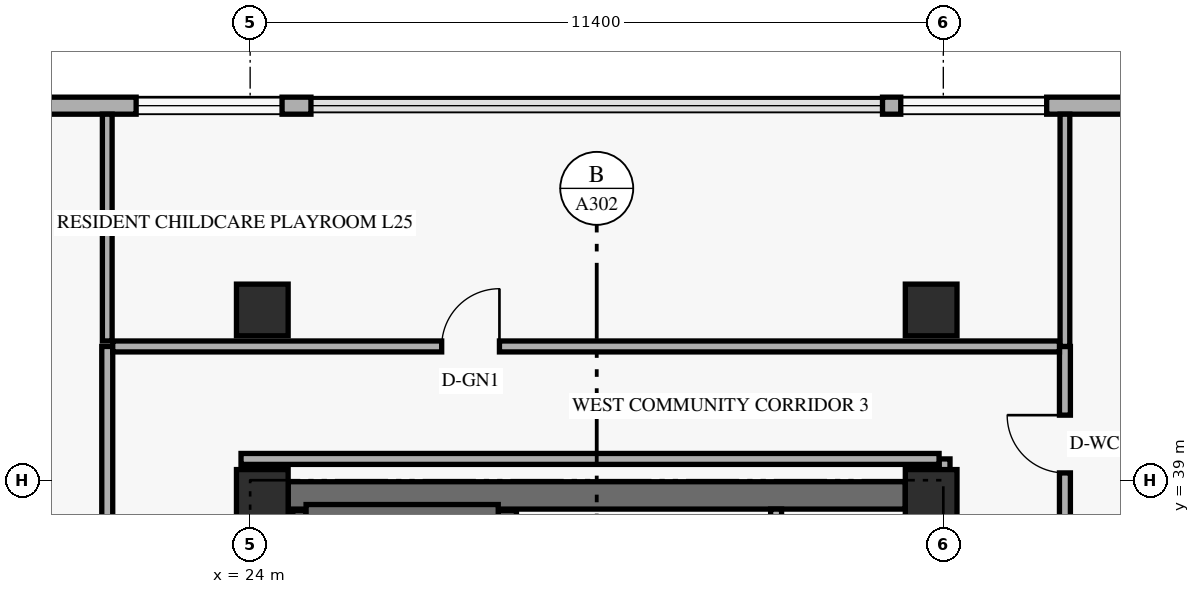
"""IFC4 building model, lengths in metres.
Left out: names, types, materials, properties, quantities, classifications, styles, units other than length and angle.
Written with IfcOpenShell. Run it as: python <this file> out.ifc"""

import sys

from ifc_helpers import new_model, si_unit, direction, frame, frame_2d, origin, origin_2d, place, context, subcontext, project, spatial, rectangle, extrude, element, fill, save


model = new_model("IFC4")
c1 = context("Model", 3, precision=1e-05, world=origin(), true_north=direction((0.0, 1.0)))
c2 = subcontext(c1, "Body", "Model", "MODEL_VIEW")
j1 = project(units=[si_unit("LENGTHUNIT", "METRE"), si_unit("PLANEANGLEUNIT", "RADIAN")], contexts=[c1])
p1 = place(None, origin())
s1 = spatial("IfcSite", under=j1, at=p1, CompositionType="ELEMENT")
p2 = place(p1, origin())
s2 = spatial("IfcBuilding", under=s1, at=p2, CompositionType="ELEMENT")
p3 = place(p2, frame((0.0, 0.0, 98.4)))
s3 = spatial("IfcBuildingStorey", under=s2, at=p3, CompositionType="ELEMENT", Elevation=98.4)
p4 = place(p3, frame((24.625, 38.75, 0.0), z_axis=(0.0, 0.0, 1.0), x_axis=(1.0, 0.0, 0.0)))
e1 = element("IfcWall", 1, at=p4, inside=s3, PredefinedType="SHEAR", context=c2, shape_type="SweptSolid", body=[
    extrude(rectangle(XDim=10.15, YDim=0.45, at=frame_2d((5.075, 0.0))), origin(), (0.0, 0.0, 1.0), 3.96),
])
p5 = place(p3, frame((24.81, 30.74, 0.0), z_axis=(0.0, 0.0, 1.0), x_axis=(0.0, 1.0, 0.0)))
e2 = element("IfcWall", 2, at=p5, inside=s3, PredefinedType="SHEAR", context=c2, shape_type="SweptSolid", body=[
    extrude(rectangle(XDim=7.76, YDim=0.22, at=frame_2d((3.88, 0.0))), origin(), (0.0, 0.0, 1.0), 3.96),
])
p6 = place(p3, frame((28.23, 30.74, 0.0), z_axis=(0.0, 0.0, 1.0), x_axis=(0.0, 1.0, 0.0)))
e3 = element("IfcWall", 3, at=p6, inside=s3, PredefinedType="SHEAR", context=c2, shape_type="SweptSolid", body=[
    extrude(rectangle(XDim=7.76, YDim=0.3, at=frame_2d((3.88, 0.0))), origin(), (0.0, 0.0, 1.0), 3.96),
])
p7 = place(p3, frame((24.92, 38.49, 0.0), z_axis=(0.0, 0.0, 1.0), x_axis=(1.0, 0.0, 0.0)))
e4 = element("IfcWall", 4, at=p7, inside=s3, PredefinedType="SHEAR", context=c2, shape_type="SweptSolid", body=[
    extrude(rectangle(XDim=3.16, YDim=0.22, at=frame_2d((1.58, 0.0))), origin(), (0.0, 0.0, 1.0), 3.96),
])
for number, where, z_axis, x_axis in (
    (5, (24.2, 38.75, 0.0), (0.0, 0.0, 1.0), (1.0, 0.0, 0.0)),
    (6, (24.2, 41.8, 0.0), (0.0, 0.0, 1.0), (1.0, 0.0, 0.0)),
    (7, (35.2, 38.75, 0.0), (0.0, 0.0, 1.0), (1.0, 0.0, 0.0)),
    (8, (35.2, 41.8, 0.0), (0.0, 0.0, 1.0), (1.0, 0.0, 0.0)),
):
    element("IfcColumn", number, at=place(p3, frame(where, z_axis=z_axis, x_axis=x_axis)), inside=s3, PredefinedType="COLUMN", context=c2, shape_type="SweptSolid", body=[
        extrude(rectangle(XDim=0.85, YDim=0.85, at=origin_2d()), origin(), (0.0, 0.0, 1.0), 4.2),
    ])
p8 = place(p3, frame((49.98, 45.16, 0.0), z_axis=(0.0, 0.0, 1.0), x_axis=(-1.0, 0.0, 0.0)))
e9 = element("IfcWall", 9, at=p8, inside=s3, PredefinedType="SOLIDWALL", context=c2, shape_type="SweptSolid", body=[
    extrude(rectangle(XDim=15.58, YDim=0.28, at=frame_2d((7.79, 0.0))), origin(), (0.0, 0.0, 1.0), 3.96),
])
p9 = place(p8, frame((12.88, 0.0, 0.85)))
e10 = element("IfcOpeningElement", 10, at=p9, cuts=e9, PredefinedType="OPENING", context=c2, shape_type="SweptSolid", body=[
    extrude(rectangle(XDim=2.4, YDim=1.9, at=frame_2d((1.2, 0.95))), frame((0.0, 0.15, 0.0), z_axis=(0.0, -1.0, 0.0), x_axis=(1.0, 0.0, 0.0)), (0.0, 0.0, 1.0), 0.3),
])
p10 = place(p8, frame((8.33, 0.0, 0.85)))
e11 = element("IfcOpeningElement", 11, at=p10, cuts=e9, PredefinedType="OPENING", context=c2, shape_type="SweptSolid", body=[
    extrude(rectangle(XDim=2.4, YDim=1.9, at=frame_2d((1.2, 0.95))), frame((0.0, 0.15, 0.0), z_axis=(0.0, -1.0, 0.0), x_axis=(1.0, 0.0, 0.0)), (0.0, 0.0, 1.0), 0.3),
])
p11 = place(p8, frame((2.04, 0.0, 0.85)))
e12 = element("IfcOpeningElement", 12, at=p11, cuts=e9, PredefinedType="OPENING", context=c2, shape_type="SweptSolid", body=[
    extrude(rectangle(XDim=2.4, YDim=1.9, at=frame_2d((1.2, 0.95))), frame((0.0, 0.15, 0.0), z_axis=(0.0, -1.0, 0.0), x_axis=(1.0, 0.0, 0.0)), (0.0, 0.0, 1.0), 0.3),
])
p12 = place(p3, frame((25.0, 45.16, 0.0), z_axis=(0.0, 0.0, 1.0), x_axis=(-1.0, 0.0, 0.0)))
e13 = element("IfcWall", 13, at=p12, inside=s3, PredefinedType="SOLIDWALL", context=c2, shape_type="SweptSolid", body=[
    extrude(rectangle(XDim=11.58, YDim=0.28, at=frame_2d((5.79, 0.0))), origin(), (0.0, 0.0, 1.0), 3.96),
])
p13 = place(p12, frame((6.265, 0.0, 0.85)))
e14 = element("IfcOpeningElement", 14, at=p13, cuts=e13, PredefinedType="OPENING", context=c2, shape_type="SweptSolid", body=[
    extrude(rectangle(XDim=2.4, YDim=1.9, at=frame_2d((1.2, 0.95))), frame((0.0, 0.15, 0.0), z_axis=(0.0, -1.0, 0.0), x_axis=(1.0, 0.0, 0.0)), (0.0, 0.0, 1.0), 0.3),
])
p14 = place(p12, frame((0.475, 0.0, 0.85)))
e15 = element("IfcOpeningElement", 15, at=p14, cuts=e13, PredefinedType="OPENING", context=c2, shape_type="SweptSolid", body=[
    extrude(rectangle(XDim=2.4, YDim=1.9, at=frame_2d((1.2, 0.95))), frame((0.0, 0.15, 0.0), z_axis=(0.0, -1.0, 0.0), x_axis=(1.0, 0.0, 0.0)), (0.0, 0.0, 1.0), 0.3),
])
p15 = place(p3, frame((32.65, 31.35, 0.0), z_axis=(0.0, 0.0, 1.0), x_axis=(0.0, 1.0, 0.0)))
e16 = element("IfcWall", 16, at=p15, inside=s3, PredefinedType="STANDARD", context=c2, shape_type="SweptSolid", body=[
    extrude(rectangle(XDim=7.175, YDim=0.18, at=frame_2d((3.587, 0.0))), origin(), (0.0, 0.0, 1.0), 3.96),
])
p16 = place(p15, frame((0.52, 0.0, 0.0)))
e17 = element("IfcOpeningElement", 17, at=p16, cuts=e16, PredefinedType="OPENING", context=c2, shape_type="SweptSolid", body=[
    extrude(rectangle(XDim=1.05, YDim=2.2, at=frame_2d((0.525, 1.1))), frame((0.0, 0.1, 0.0), z_axis=(0.0, -1.0, 0.0), x_axis=(1.0, 0.0, 0.0)), (0.0, 0.0, 1.0), 0.2),
])
p17 = place(p15, frame((2.67, 0.0, 0.0)))
e18 = element("IfcOpeningElement", 18, at=p17, cuts=e16, PredefinedType="OPENING", context=c2, shape_type="SweptSolid", body=[
    extrude(rectangle(XDim=1.05, YDim=2.2, at=frame_2d((0.525, 1.1))), frame((0.0, 0.1, 0.0), z_axis=(0.0, -1.0, 0.0), x_axis=(1.0, 0.0, 0.0)), (0.0, 0.0, 1.0), 0.2),
])
p18 = place(p15, frame((4.82, 0.0, 0.0)))
e19 = element("IfcOpeningElement", 19, at=p18, cuts=e16, PredefinedType="OPENING", context=c2, shape_type="SweptSolid", body=[
    extrude(rectangle(XDim=1.05, YDim=2.2, at=frame_2d((0.525, 1.1))), frame((0.0, 0.1, 0.0), z_axis=(0.0, -1.0, 0.0), x_axis=(1.0, 0.0, 0.0)), (0.0, 0.0, 1.0), 0.2),
])
p19 = place(p3, frame((37.4, 6.8, 0.0), z_axis=(0.0, 0.0, 1.0), x_axis=(0.0, 1.0, 0.0)))
e20 = element("IfcWall", 20, at=p19, inside=s3, PredefinedType="STANDARD", context=c2, shape_type="SweptSolid", body=[
    extrude(rectangle(XDim=34.4, YDim=0.18, at=frame_2d((17.2, 0.0))), origin(), (0.0, 0.0, 1.0), 3.331),
])
p20 = place(p19, frame((25.29, 0.0, 0.0)))
e21 = element("IfcOpeningElement", 21, at=p20, cuts=e20, PredefinedType="OPENING", context=c2, shape_type="SweptSolid", body=[
    extrude(rectangle(XDim=0.92, YDim=2.14, at=frame_2d((0.46, 1.07))), frame((0.0, 0.1, 0.0), z_axis=(0.0, -1.0, 0.0), x_axis=(1.0, 0.0, 0.0)), (0.0, 0.0, 1.0), 0.2),
])
p21 = place(p19, frame((32.32, 0.0, 0.0)))
e22 = element("IfcOpeningElement", 22, at=p21, cuts=e20, PredefinedType="OPENING", context=c2, shape_type="SweptSolid", body=[
    extrude(rectangle(XDim=0.95, YDim=2.14, at=frame_2d((0.475, 1.07))), frame((0.0, 0.1, 0.0), z_axis=(0.0, -1.0, 0.0), x_axis=(1.0, 0.0, 0.0)), (0.0, 0.0, 1.0), 0.2),
])
p22 = place(p19, frame((2.8, 0.0, 0.0)))
e23 = element("IfcOpeningElement", 23, at=p22, cuts=e20, PredefinedType="OPENING", context=c2, shape_type="SweptSolid", body=[
    extrude(rectangle(XDim=1.15, YDim=2.15, at=frame_2d((0.575, 1.075))), frame((0.0, 0.1, 0.0), z_axis=(0.0, -1.0, 0.0), x_axis=(1.0, 0.0, 0.0)), (0.0, 0.0, 1.0), 0.2),
])
p23 = place(p19, frame((21.6, 0.0, 0.0)))
e24 = element("IfcOpeningElement", 24, at=p23, cuts=e20, PredefinedType="OPENING", context=c2, shape_type="SweptSolid", body=[
    extrude(rectangle(XDim=1.15, YDim=2.15, at=frame_2d((0.575, 1.075))), frame((0.0, 0.1, 0.0), z_axis=(0.0, -1.0, 0.0), x_axis=(1.0, 0.0, 0.0)), (0.0, 0.0, 1.0), 0.2),
])
p24 = place(p3, frame((37.4, 41.2, 0.0), z_axis=(0.0, 0.0, 1.0), x_axis=(0.0, 1.0, 0.0)))
e25 = element("IfcWall", 25, at=p24, inside=s3, PredefinedType="PARTITIONING", context=c2, shape_type="SweptSolid", body=[
    extrude(rectangle(XDim=3.82, YDim=0.16, at=frame_2d((1.91, 0.0))), origin(), (0.0, 0.0, 1.0), 3.409),
])
p25 = place(p3, frame((35.42, 38.75, 0.0), z_axis=(0.0, 0.0, 1.0), x_axis=(0.0, 1.0, 0.0)))
e26 = element("IfcWall", 26, at=p25, inside=s3, PredefinedType="STANDARD", context=c2, shape_type="SweptSolid", body=[
    extrude(rectangle(XDim=0.6, YDim=0.18, at=frame_2d((0.3, 0.0))), origin(), (0.0, 0.0, 1.0), 3.331),
])
p26 = place(p3, frame((21.65, 6.8, 0.0), z_axis=(0.0, 0.0, 1.0), x_axis=(0.0, 1.0, 0.0)))
e27 = element("IfcWall", 27, at=p26, inside=s3, PredefinedType="STANDARD", context=c2, shape_type="SweptSolid", body=[
    extrude(rectangle(XDim=34.4, YDim=0.18, at=frame_2d((17.2, 0.0))), origin(), (0.0, 0.0, 1.0), 3.331),
])
p27 = place(p26, frame((15.2, 0.0, 0.0)))
e28 = element("IfcOpeningElement", 28, at=p27, cuts=e27, PredefinedType="OPENING", context=c2, shape_type="SweptSolid", body=[
    extrude(rectangle(XDim=0.95, YDim=2.15, at=frame_2d((0.475, 1.075))), frame((0.0, 0.1, 0.0), z_axis=(0.0, -1.0, 0.0), x_axis=(1.0, 0.0, 0.0)), (0.0, 0.0, 1.0), 0.2),
])
p28 = place(p26, frame((6.2, 0.0, 0.0)))
e29 = element("IfcOpeningElement", 29, at=p28, cuts=e27, PredefinedType="OPENING", context=c2, shape_type="SweptSolid", body=[
    extrude(rectangle(XDim=0.95, YDim=2.15, at=frame_2d((0.475, 1.075))), frame((0.0, 0.1, 0.0), z_axis=(0.0, -1.0, 0.0), x_axis=(1.0, 0.0, 0.0)), (0.0, 0.0, 1.0), 0.2),
])
p29 = place(p26, frame((26.5, 0.0, 0.0)))
e30 = element("IfcOpeningElement", 30, at=p29, cuts=e27, PredefinedType="OPENING", context=c2, shape_type="SweptSolid", body=[
    extrude(rectangle(XDim=0.95, YDim=2.15, at=frame_2d((0.475, 1.075))), frame((0.0, 0.1, 0.0), z_axis=(0.0, -1.0, 0.0), x_axis=(1.0, 0.0, 0.0)), (0.0, 0.0, 1.0), 0.2),
])
p30 = place(p3, frame((21.74, 41.2, 0.0), z_axis=(0.0, 0.0, 1.0), x_axis=(1.0, 0.0, 0.0)))
e31 = element("IfcWall", 31, at=p30, inside=s3, PredefinedType="STANDARD", context=c2, shape_type="SweptSolid", body=[
    extrude(rectangle(XDim=15.57, YDim=0.18, at=frame_2d((7.785, 0.0))), origin(), (0.0, 0.0, 1.0), 3.331),
])
p31 = place(p30, frame((5.41, 0.0, 0.0)))
e32 = element("IfcOpeningElement", 32, at=p31, cuts=e31, PredefinedType="OPENING", context=c2, shape_type="SweptSolid", body=[
    extrude(rectangle(XDim=0.95, YDim=2.15, at=frame_2d((0.475, 1.075))), frame((0.0, 0.1, 0.0), z_axis=(0.0, -1.0, 0.0), x_axis=(1.0, 0.0, 0.0)), (0.0, 0.0, 1.0), 0.2),
])
p32 = place(p3, frame((23.85, 39.35, 0.0), z_axis=(0.0, 0.0, 1.0), x_axis=(1.0, 0.0, 0.0)))
e33 = element("IfcWall", 33, at=p32, inside=s3, PredefinedType="STANDARD", context=c2, shape_type="SweptSolid", body=[
    extrude(rectangle(XDim=11.48, YDim=0.18, at=frame_2d((5.74, 0.0))), origin(), (0.0, 0.0, 1.0), 3.331),
])
p33 = place(p3, frame((21.65, 41.29, 0.0), z_axis=(0.0, 0.0, 1.0), x_axis=(0.0, 1.0, 0.0)))
e34 = element("IfcWall", 34, at=p33, inside=s3, PredefinedType="PARTITIONING", context=c2, shape_type="SweptSolid", body=[
    extrude(rectangle(XDim=3.73, YDim=0.16, at=frame_2d((1.865, 0.0))), origin(), (0.0, 0.0, 1.0), 3.409),
])
p34 = place(p9, origin())
e35 = element("IfcWindow", 35, at=p34, inside=s3, PartitioningType="SINGLE_PANEL", PredefinedType="WINDOW", context=c2, shape_type="SweptSolid", body=[
    extrude(rectangle(XDim=2.4, YDim=1.9, at=frame_2d((1.2, 0.95))), frame((0.0, 0.03, 0.0), z_axis=(0.0, -1.0, 0.0), x_axis=(1.0, 0.0, 0.0)), (0.0, 0.0, 1.0), 0.06),
])
fill(e10, e35)
p35 = place(p14, origin())
e36 = element("IfcWindow", 36, at=p35, inside=s3, PartitioningType="SINGLE_PANEL", PredefinedType="WINDOW", context=c2, shape_type="SweptSolid", body=[
    extrude(rectangle(XDim=2.4, YDim=1.9, at=frame_2d((1.2, 0.95))), frame((0.0, 0.03, 0.0), z_axis=(0.0, -1.0, 0.0), x_axis=(1.0, 0.0, 0.0)), (0.0, 0.0, 1.0), 0.06),
])
fill(e15, e36)
p36 = place(p21, origin())
e37 = element("IfcDoor", 37, at=p36, inside=s3, OperationType="SINGLE_SWING_RIGHT", PredefinedType="DOOR", context=c2, shape_type="SweptSolid", body=[
    extrude(rectangle(XDim=0.95, YDim=2.14, at=frame_2d((0.475, 1.07))), frame((0.0, 0.025, 0.0), z_axis=(0.0, -1.0, 0.0), x_axis=(1.0, 0.0, 0.0)), (0.0, 0.0, 1.0), 0.05),
])
fill(e22, e37)
p37 = place(p31, origin())
e38 = element("IfcDoor", 38, at=p37, inside=s3, OperationType="SINGLE_SWING_RIGHT", PredefinedType="DOOR", context=c2, shape_type="SweptSolid", body=[
    extrude(rectangle(XDim=0.95, YDim=2.15, at=frame_2d((0.475, 1.075))), frame((0.0, 0.025, 0.0), z_axis=(0.0, -1.0, 0.0), x_axis=(1.0, 0.0, 0.0)), (0.0, 0.0, 1.0), 0.05),
])
fill(e32, e38)
save(model, sys.argv[1])
